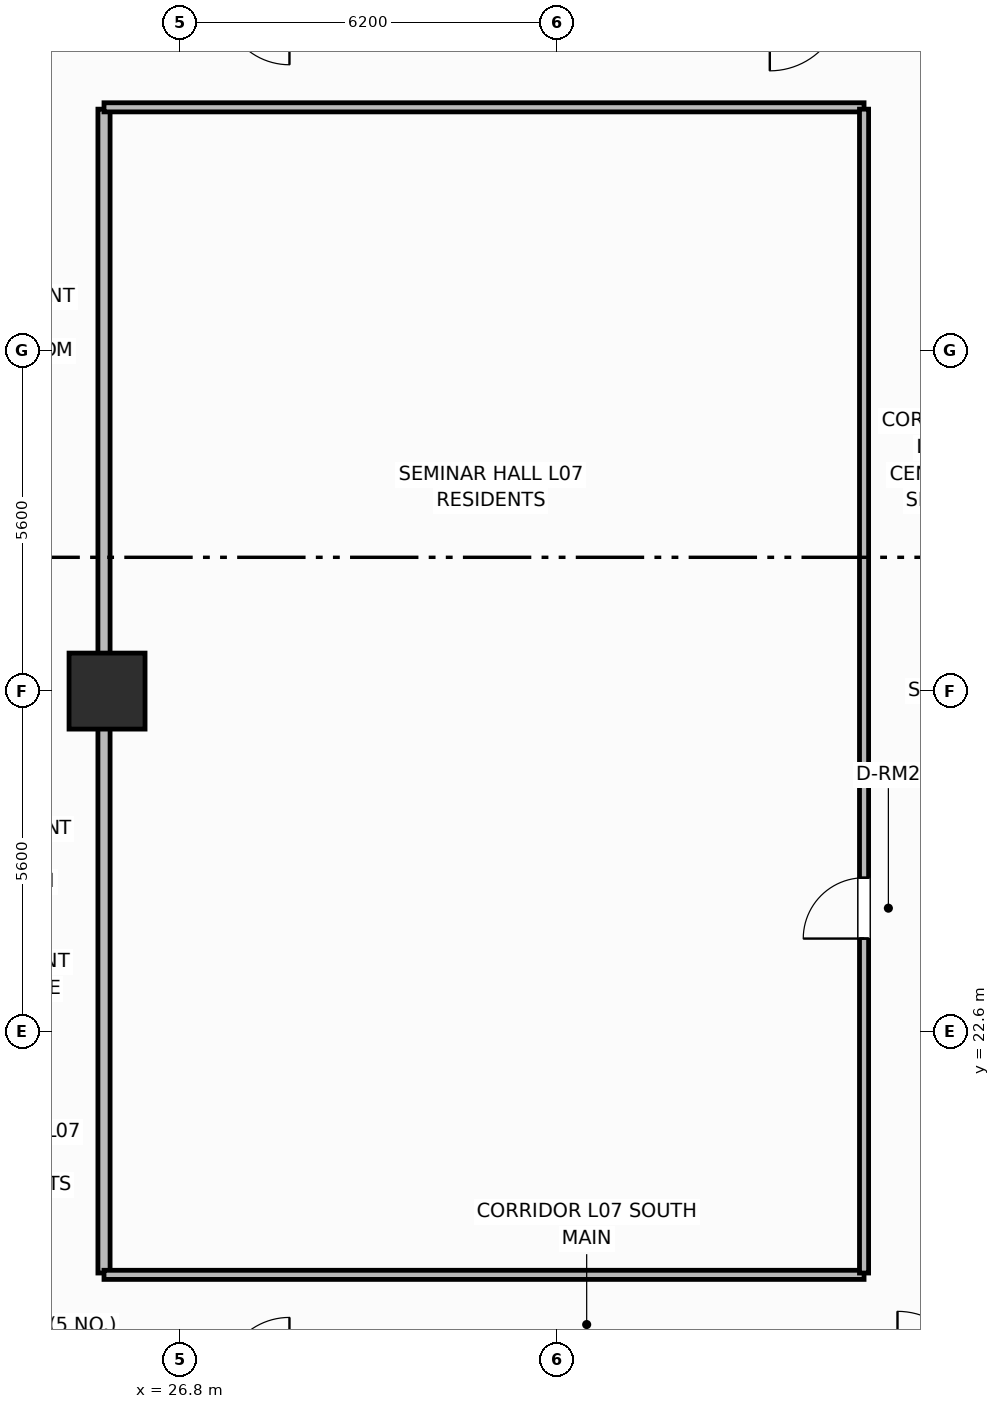
"""IFC4 building model, lengths in metres.
Left out: names, types, materials, properties, quantities, classifications, styles, units other than length and angle.
Written with IfcOpenShell. Run it as: python <this file> out.ifc"""

import sys

from ifc_helpers import new_model, si_unit, direction, frame, frame_2d, origin, origin_2d, place, context, subcontext, project, spatial, rectangle, extrude, element, fill, save


model = new_model("IFC4")
c1 = context("Model", 3, precision=1e-05, world=origin(), true_north=direction((0.0, 1.0)))
c2 = subcontext(c1, "Body", "Model", "MODEL_VIEW")
j1 = project(units=[si_unit("LENGTHUNIT", "METRE"), si_unit("PLANEANGLEUNIT", "RADIAN")], contexts=[c1])
p1 = place(None, origin())
s1 = spatial("IfcSite", under=j1, at=p1, CompositionType="ELEMENT")
p2 = place(p1, origin())
s2 = spatial("IfcBuilding", under=s1, at=p2, CompositionType="ELEMENT")
p3 = place(p2, frame((0.0, 0.0, 32.5)))
s3 = spatial("IfcBuildingStorey", under=s2, at=p3, CompositionType="ELEMENT", Elevation=32.5)
p4 = place(p3, frame((25.6, 28.2, 0.0), z_axis=(0.0, 0.0, 1.0), x_axis=(1.0, 0.0, 0.0)))
e1 = element("IfcColumn", 1, at=p4, inside=s3, PredefinedType="COLUMN", context=c2, shape_type="SweptSolid", body=[
    extrude(rectangle(XDim=1.25, YDim=1.25, at=origin_2d()), origin(), (0.0, 0.0, 1.0), 3.7),
])
p5 = place(p3, frame((25.55, 18.63, 0.0), z_axis=(0.0, 0.0, 1.0), x_axis=(0.0, 1.0, 0.0)))
e2 = element("IfcWall", 2, at=p5, inside=s3, PredefinedType="PARTITIONING", context=c2, shape_type="SweptSolid", body=[
    extrude(rectangle(XDim=19.14, YDim=0.2, at=frame_2d((9.57, 0.0))), origin(), (0.0, 0.0, 1.0), 2.53),
])
for number, where, z_axis, x_axis in (
    (3, (25.55, 18.6, 0.0), (0.0, 0.0, 1.0), (1.0, 0.0, 0.0)),
    (4, (25.55, 37.8, 0.0), (0.0, 0.0, 1.0), (1.0, 0.0, 0.0)),
):
    element("IfcWall", number, at=place(p3, frame(where, z_axis=z_axis, x_axis=x_axis)), inside=s3, PredefinedType="PARTITIONING", context=c2, shape_type="SweptSolid", body=[
        extrude(rectangle(XDim=12.5, YDim=0.15, at=frame_2d((6.25, 0.0))), origin(), (0.0, 0.0, 1.0), 2.53),
    ])
p6 = place(p3, frame((38.05, 18.63, 0.0), z_axis=(0.0, 0.0, 1.0), x_axis=(0.0, 1.0, 0.0)))
e5 = element("IfcWall", 5, at=p6, inside=s3, PredefinedType="PARTITIONING", context=c2, shape_type="SweptSolid", body=[
    extrude(rectangle(XDim=19.14, YDim=0.15, at=frame_2d((9.57, 0.0))), origin(), (0.0, 0.0, 1.0), 2.53),
])
p7 = place(p6, frame((5.5, 0.0, 0.0)))
e6 = element("IfcOpeningElement", 6, at=p7, cuts=e5, PredefinedType="OPENING", context=c2, shape_type="SweptSolid", body=[
    extrude(rectangle(XDim=1.0, YDim=2.15, at=frame_2d((0.5, 1.075))), frame((0.0, 0.085, 0.0), z_axis=(0.0, -1.0, 0.0), x_axis=(1.0, 0.0, 0.0)), (0.0, 0.0, 1.0), 0.17),
])
p8 = place(p7, origin())
e7 = element("IfcDoor", 7, at=p8, inside=s3, OperationType="SINGLE_SWING_LEFT", PredefinedType="DOOR", context=c2, shape_type="SweptSolid", body=[
    extrude(rectangle(XDim=1.0, YDim=2.15, at=frame_2d((0.5, 1.075))), frame((0.0, 0.025, 0.0), z_axis=(0.0, -1.0, 0.0), x_axis=(1.0, 0.0, 0.0)), (0.0, 0.0, 1.0), 0.05),
])
fill(e6, e7)
save(model, sys.argv[1])
